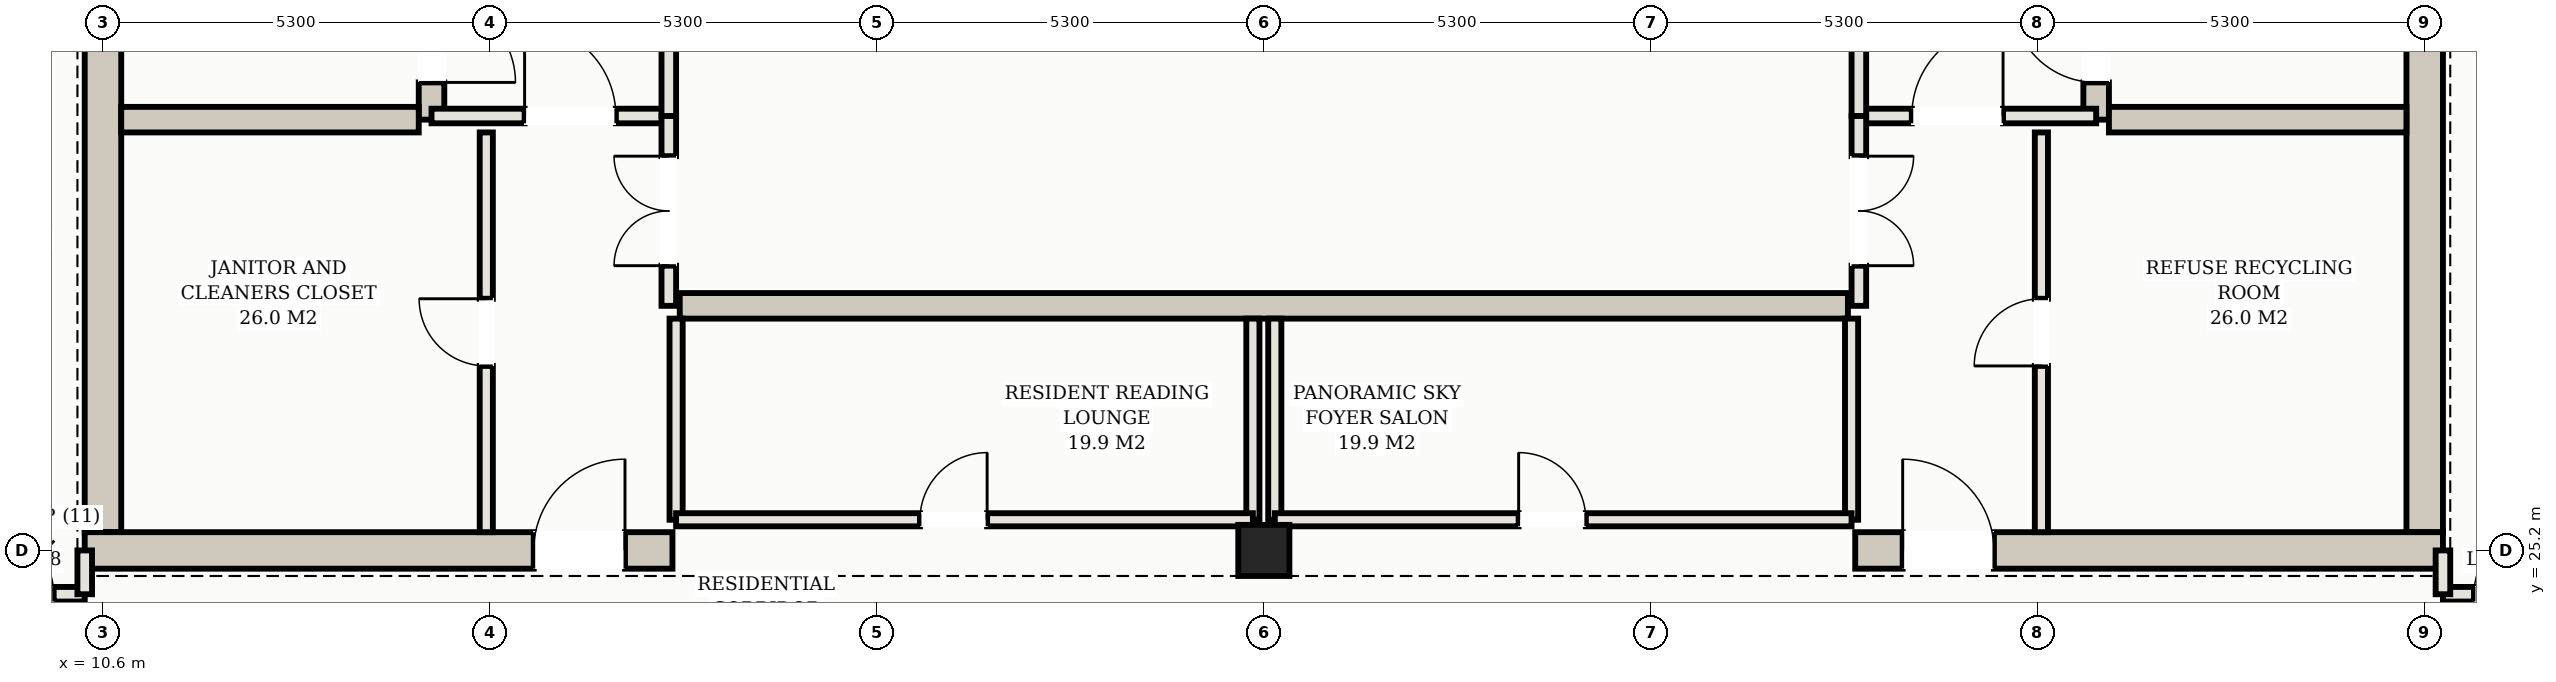
"""IFC4 building model, lengths in metres.
Left out: names, types, materials, properties, quantities, classifications, styles, units other than length and angle.
Written with IfcOpenShell. Run it as: python <this file> out.ifc"""

import sys

from ifc_helpers import new_model, si_unit, direction, frame, frame_2d, origin, origin_2d, place, context, subcontext, project, spatial, rectangle, hollow_rectangle, extrude, element, fill, save


model = new_model("IFC4")
c1 = context("Model", 3, precision=1e-05, world=origin(), true_north=direction((0.0, 1.0)))
c2 = subcontext(c1, "Body", "Model", "MODEL_VIEW")
j1 = project(units=[si_unit("LENGTHUNIT", "METRE"), si_unit("PLANEANGLEUNIT", "RADIAN")], contexts=[c1])
p1 = place(None, origin())
s1 = spatial("IfcSite", under=j1, at=p1, CompositionType="ELEMENT")
p2 = place(p1, origin())
s2 = spatial("IfcBuilding", under=s1, at=p2, CompositionType="ELEMENT")
p3 = place(p2, frame((0.0, 0.0, 239.6)))
s3 = spatial("IfcBuildingStorey", under=s2, at=p3, CompositionType="ELEMENT", Elevation=239.6)
for number, where, z_axis, x_axis in (
    (1, (10.6, 25.45, 0.0), (0.0, 0.0, 1.0), (0.0, 1.0, 0.0)),
    (2, (42.4, 25.45, 0.0), (0.0, 0.0, 1.0), (0.0, 1.0, 0.0)),
):
    element("IfcWall", number, at=place(p3, frame(where, z_axis=z_axis, x_axis=x_axis)), inside=s3, PredefinedType="SHEAR", context=c2, shape_type="SweptSolid", body=[
        extrude(rectangle(XDim=14.3, YDim=0.5, at=frame_2d((7.15, 0.0))), origin(), (0.0, 0.0, 1.0), 3.11),
    ])
p4 = place(p3, frame((10.35, 25.2, 0.0), z_axis=(0.0, 0.0, 1.0), x_axis=(1.0, 0.0, 0.0)))
e3 = element("IfcWall", 3, at=p4, inside=s3, PredefinedType="SHEAR", context=c2, shape_type="SweptSolid", body=[
    extrude(rectangle(XDim=8.05, YDim=0.5, at=frame_2d((4.025, 0.0))), origin(), (0.0, 0.0, 1.0), 3.11),
])
p5 = place(p4, frame((6.15, 0.0, 0.0)))
e4 = element("IfcOpeningElement", 4, at=p5, cuts=e3, PredefinedType="OPENING", context=c2, shape_type="SweptSolid", body=[
    extrude(rectangle(XDim=1.25, YDim=2.2, at=frame_2d((0.625, 1.1))), frame((0.0, 0.26, 0.0), z_axis=(0.0, -1.0, 0.0), x_axis=(1.0, 0.0, 0.0)), (0.0, 0.0, 1.0), 0.52),
])
p6 = place(p3, frame((34.6, 25.2, 0.0), z_axis=(0.0, 0.0, 1.0), x_axis=(1.0, 0.0, 0.0)))
e5 = element("IfcWall", 5, at=p6, inside=s3, PredefinedType="SHEAR", context=c2, shape_type="SweptSolid", body=[
    extrude(rectangle(XDim=8.05, YDim=0.5, at=frame_2d((4.025, 0.0))), origin(), (0.0, 0.0, 1.0), 3.11),
])
p7 = place(p6, frame((0.65, 0.0, 0.0)))
e6 = element("IfcOpeningElement", 6, at=p7, cuts=e5, PredefinedType="OPENING", context=c2, shape_type="SweptSolid", body=[
    extrude(rectangle(XDim=1.25, YDim=2.2, at=frame_2d((0.625, 1.1))), frame((0.0, 0.26, 0.0), z_axis=(0.0, -1.0, 0.0), x_axis=(1.0, 0.0, 0.0)), (0.0, 0.0, 1.0), 0.52),
])
p8 = place(p3, frame((15.1, 31.1, 0.0), z_axis=(0.0, 0.0, 1.0), x_axis=(0.0, 1.0, 0.0)))
e7 = element("IfcWall", 7, at=p8, inside=s3, PredefinedType="SHEAR", context=c2, shape_type="SweptSolid", body=[
    extrude(rectangle(XDim=8.65, YDim=0.35, at=frame_2d((4.325, 0.0))), origin(), (0.0, 0.0, 1.0), 3.11),
])
p9 = place(p8, frame((0.51, 0.0, 0.0)))
e8 = element("IfcOpeningElement", 8, at=p9, cuts=e7, PredefinedType="OPENING", context=c2, shape_type="SweptSolid", body=[
    extrude(rectangle(XDim=1.15, YDim=2.2, at=frame_2d((0.575, 1.1))), frame((0.0, 0.185, 0.0), z_axis=(0.0, -1.0, 0.0), x_axis=(1.0, 0.0, 0.0)), (0.0, 0.0, 1.0), 0.37),
])
p10 = place(p3, frame((10.85, 31.1, 0.0), z_axis=(0.0, 0.0, 1.0), x_axis=(1.0, 0.0, 0.0)))
e9 = element("IfcWall", 9, at=p10, inside=s3, PredefinedType="SHEAR", context=c2, shape_type="SweptSolid", body=[
    extrude(rectangle(XDim=4.075, YDim=0.35, at=frame_2d((2.038, 0.0))), origin(), (0.0, 0.0, 1.0), 3.11),
])
p11 = place(p3, frame((37.9, 31.1, 0.0), z_axis=(0.0, 0.0, 1.0), x_axis=(0.0, 1.0, 0.0)))
e10 = element("IfcWall", 10, at=p11, inside=s3, PredefinedType="SHEAR", context=c2, shape_type="SweptSolid", body=[
    extrude(rectangle(XDim=8.65, YDim=0.35, at=frame_2d((4.325, 0.0))), origin(), (0.0, 0.0, 1.0), 3.11),
])
p12 = place(p11, frame((0.51, 0.0, 0.0)))
e11 = element("IfcOpeningElement", 11, at=p12, cuts=e10, PredefinedType="OPENING", context=c2, shape_type="SweptSolid", body=[
    extrude(rectangle(XDim=1.15, YDim=2.2, at=frame_2d((0.575, 1.1))), frame((0.0, 0.185, 0.0), z_axis=(0.0, -1.0, 0.0), x_axis=(1.0, 0.0, 0.0)), (0.0, 0.0, 1.0), 0.37),
])
p13 = place(p3, frame((38.075, 31.1, 0.0), z_axis=(0.0, 0.0, 1.0), x_axis=(1.0, 0.0, 0.0)))
e12 = element("IfcWall", 12, at=p13, inside=s3, PredefinedType="SHEAR", context=c2, shape_type="SweptSolid", body=[
    extrude(rectangle(XDim=4.075, YDim=0.35, at=frame_2d((2.038, 0.0))), origin(), (0.0, 0.0, 1.0), 3.11),
])
p14 = place(p3, frame((18.5, 28.55, 0.0), z_axis=(0.0, 0.0, 1.0), x_axis=(1.0, 0.0, 0.0)))
e13 = element("IfcWall", 13, at=p14, inside=s3, PredefinedType="SHEAR", context=c2, shape_type="SweptSolid", body=[
    extrude(rectangle(XDim=16.0, YDim=0.35, at=frame_2d((8.0, 0.0))), origin(), (0.0, 0.0, 1.0), 3.11),
])
p15 = place(p3, frame((26.5, 25.2, 0.0), z_axis=(0.0, 0.0, 1.0), x_axis=(1.0, 0.0, 0.0)))
e14 = element("IfcColumn", 14, at=p15, inside=s3, PredefinedType="COLUMN", context=c2, shape_type="SweptSolid", body=[
    extrude(hollow_rectangle(XDim=0.7, YDim=0.7, WallThickness=0.025, at=origin_2d()), origin(), (0.0, 0.0, 1.0), 3.3),
])
p16 = place(p3, frame((15.1, 31.15, 0.0), z_axis=(0.0, 0.0, 1.0), x_axis=(1.0, 0.0, 0.0)))
e15 = element("IfcWall", 15, at=p16, inside=s3, PredefinedType="PARTITIONING", context=c2, shape_type="SweptSolid", body=[
    extrude(rectangle(XDim=3.25, YDim=0.2, at=frame_2d((1.625, 0.0))), origin(), (0.0, 0.0, 1.0), 2.45),
])
p17 = place(p16, frame((1.275, 0.0, 0.0)))
e16 = element("IfcOpeningElement", 16, at=p17, cuts=e15, PredefinedType="OPENING", context=c2, shape_type="SweptSolid", body=[
    extrude(rectangle(XDim=1.25, YDim=2.2, at=frame_2d((0.625, 1.1))), frame((0.0, 0.11, 0.0), z_axis=(0.0, -1.0, 0.0), x_axis=(1.0, 0.0, 0.0)), (0.0, 0.0, 1.0), 0.22),
])
p18 = place(p3, frame((18.35, 31.15, 0.0), z_axis=(0.0, 0.0, 1.0), x_axis=(0.0, 1.0, 0.0)))
e17 = element("IfcWall", 17, at=p18, inside=s3, PredefinedType="PARTITIONING", context=c2, shape_type="SweptSolid", body=[
    extrude(rectangle(XDim=5.15, YDim=0.2, at=frame_2d((2.575, 0.0))), origin(), (0.0, 0.0, 1.0), 2.45),
])
p19 = place(p18, frame((1.875, 0.0, 0.0)))
e18 = element("IfcOpeningElement", 18, at=p19, cuts=e17, PredefinedType="OPENING", context=c2, shape_type="SweptSolid", body=[
    extrude(rectangle(XDim=1.25, YDim=2.2, at=frame_2d((0.625, 1.1))), frame((0.0, 0.11, 0.0), z_axis=(0.0, -1.0, 0.0), x_axis=(1.0, 0.0, 0.0)), (0.0, 0.0, 1.0), 0.22),
])
p20 = place(p3, frame((34.65, 31.15, 0.0), z_axis=(0.0, 0.0, 1.0), x_axis=(1.0, 0.0, 0.0)))
e19 = element("IfcWall", 19, at=p20, inside=s3, PredefinedType="PARTITIONING", context=c2, shape_type="SweptSolid", body=[
    extrude(rectangle(XDim=3.25, YDim=0.2, at=frame_2d((1.625, 0.0))), origin(), (0.0, 0.0, 1.0), 2.45),
])
p21 = place(p20, frame((0.725, 0.0, 0.0)))
e20 = element("IfcOpeningElement", 20, at=p21, cuts=e19, PredefinedType="OPENING", context=c2, shape_type="SweptSolid", body=[
    extrude(rectangle(XDim=1.25, YDim=2.2, at=frame_2d((0.625, 1.1))), frame((0.0, 0.11, 0.0), z_axis=(0.0, -1.0, 0.0), x_axis=(1.0, 0.0, 0.0)), (0.0, 0.0, 1.0), 0.22),
])
p22 = place(p3, frame((34.65, 31.15, 0.0), z_axis=(0.0, 0.0, 1.0), x_axis=(0.0, 1.0, 0.0)))
e21 = element("IfcWall", 21, at=p22, inside=s3, PredefinedType="PARTITIONING", context=c2, shape_type="SweptSolid", body=[
    extrude(rectangle(XDim=5.15, YDim=0.2, at=frame_2d((2.575, 0.0))), origin(), (0.0, 0.0, 1.0), 2.45),
])
p23 = place(p22, frame((1.875, 0.0, 0.0)))
e22 = element("IfcOpeningElement", 22, at=p23, cuts=e21, PredefinedType="OPENING", context=c2, shape_type="SweptSolid", body=[
    extrude(rectangle(XDim=1.25, YDim=2.2, at=frame_2d((0.625, 1.1))), frame((0.0, 0.11, 0.0), z_axis=(0.0, -1.0, 0.0), x_axis=(1.0, 0.0, 0.0)), (0.0, 0.0, 1.0), 0.22),
])
p24 = place(p3, frame((15.85, 25.45, 0.0), z_axis=(0.0, 0.0, 1.0), x_axis=(0.0, 1.0, 0.0)))
e23 = element("IfcWall", 23, at=p24, inside=s3, PredefinedType="PARTITIONING", context=c2, shape_type="SweptSolid", body=[
    extrude(rectangle(XDim=5.475, YDim=0.18, at=frame_2d((2.738, 0.0))), origin(), (0.0, 0.0, 1.0), 2.45),
])
p25 = place(p24, frame((2.277, 0.0, 0.0)))
e24 = element("IfcOpeningElement", 24, at=p25, cuts=e23, PredefinedType="OPENING", context=c2, shape_type="SweptSolid", body=[
    extrude(rectangle(XDim=0.92, YDim=2.15, at=frame_2d((0.46, 1.075))), frame((0.0, 0.1, 0.0), z_axis=(0.0, -1.0, 0.0), x_axis=(1.0, 0.0, 0.0)), (0.0, 0.0, 1.0), 0.2),
])
p26 = place(p3, frame((37.15, 25.45, 0.0), z_axis=(0.0, 0.0, 1.0), x_axis=(0.0, 1.0, 0.0)))
e25 = element("IfcWall", 25, at=p26, inside=s3, PredefinedType="PARTITIONING", context=c2, shape_type="SweptSolid", body=[
    extrude(rectangle(XDim=5.475, YDim=0.18, at=frame_2d((2.738, 0.0))), origin(), (0.0, 0.0, 1.0), 2.45),
])
p27 = place(p26, frame((2.277, 0.0, 0.0)))
e26 = element("IfcOpeningElement", 26, at=p27, cuts=e25, PredefinedType="OPENING", context=c2, shape_type="SweptSolid", body=[
    extrude(rectangle(XDim=0.92, YDim=2.15, at=frame_2d((0.46, 1.075))), frame((0.0, 0.1, 0.0), z_axis=(0.0, -1.0, 0.0), x_axis=(1.0, 0.0, 0.0)), (0.0, 0.0, 1.0), 0.2),
])
p28 = place(p3, frame((18.35, 28.55, 0.0), z_axis=(0.0, 0.0, 1.0), x_axis=(0.0, 1.0, 0.0)))
e27 = element("IfcWall", 27, at=p28, inside=s3, PredefinedType="PARTITIONING", context=c2, shape_type="SweptSolid", body=[
    extrude(rectangle(XDim=2.6, YDim=0.2, at=frame_2d((1.3, 0.0))), origin(), (0.0, 0.0, 1.0), 2.45),
])
p29 = place(p28, frame((0.55, 0.0, 0.0)))
e28 = element("IfcOpeningElement", 28, at=p29, cuts=e27, PredefinedType="OPENING", context=c2, shape_type="SweptSolid", body=[
    extrude(rectangle(XDim=1.5, YDim=2.25, at=frame_2d((0.75, 1.125))), frame((0.0, 0.11, 0.0), z_axis=(0.0, -1.0, 0.0), x_axis=(1.0, 0.0, 0.0)), (0.0, 0.0, 1.0), 0.22),
])
p30 = place(p3, frame((34.65, 28.55, 0.0), z_axis=(0.0, 0.0, 1.0), x_axis=(0.0, 1.0, 0.0)))
e29 = element("IfcWall", 29, at=p30, inside=s3, PredefinedType="PARTITIONING", context=c2, shape_type="SweptSolid", body=[
    extrude(rectangle(XDim=2.6, YDim=0.2, at=frame_2d((1.3, 0.0))), origin(), (0.0, 0.0, 1.0), 2.45),
])
p31 = place(p30, frame((0.55, 0.0, 0.0)))
e30 = element("IfcOpeningElement", 30, at=p31, cuts=e29, PredefinedType="OPENING", context=c2, shape_type="SweptSolid", body=[
    extrude(rectangle(XDim=1.5, YDim=2.25, at=frame_2d((0.75, 1.125))), frame((0.0, 0.11, 0.0), z_axis=(0.0, -1.0, 0.0), x_axis=(1.0, 0.0, 0.0)), (0.0, 0.0, 1.0), 0.22),
])
for number, where, z_axis, x_axis in (
    (31, (18.45, 25.62, 0.0), (0.0, 0.0, 1.0), (0.0, 1.0, 0.0)),
    (32, (26.35, 25.62, 0.0), (0.0, 0.0, 1.0), (0.0, 1.0, 0.0)),
):
    element("IfcWall", number, at=place(p3, frame(where, z_axis=z_axis, x_axis=x_axis)), inside=s3, PredefinedType="PARTITIONING", context=c2, shape_type="SweptSolid", body=[
        extrude(rectangle(XDim=2.755, YDim=0.18, at=frame_2d((1.377, 0.0))), origin(), (0.0, 0.0, 1.0), 2.45),
    ])
p32 = place(p3, frame((18.45, 25.62, 0.0), z_axis=(0.0, 0.0, 1.0), x_axis=(1.0, 0.0, 0.0)))
e33 = element("IfcWall", 33, at=p32, inside=s3, PredefinedType="PARTITIONING", context=c2, shape_type="SweptSolid", body=[
    extrude(rectangle(XDim=7.9, YDim=0.18, at=frame_2d((3.95, 0.0))), origin(), (0.0, 0.0, 1.0), 2.45),
])
p33 = place(p32, frame((3.34, 0.0, 0.0)))
e34 = element("IfcOpeningElement", 34, at=p33, cuts=e33, PredefinedType="OPENING", context=c2, shape_type="SweptSolid", body=[
    extrude(rectangle(XDim=0.92, YDim=2.15, at=frame_2d((0.46, 1.075))), frame((0.0, 0.1, 0.0), z_axis=(0.0, -1.0, 0.0), x_axis=(1.0, 0.0, 0.0)), (0.0, 0.0, 1.0), 0.2),
])
for number, where, z_axis, x_axis in (
    (35, (26.65, 25.62, 0.0), (0.0, 0.0, 1.0), (0.0, 1.0, 0.0)),
    (36, (34.55, 25.62, 0.0), (0.0, 0.0, 1.0), (0.0, 1.0, 0.0)),
):
    element("IfcWall", number, at=place(p3, frame(where, z_axis=z_axis, x_axis=x_axis)), inside=s3, PredefinedType="PARTITIONING", context=c2, shape_type="SweptSolid", body=[
        extrude(rectangle(XDim=2.755, YDim=0.18, at=frame_2d((1.377, 0.0))), origin(), (0.0, 0.0, 1.0), 2.45),
    ])
p34 = place(p3, frame((26.65, 25.62, 0.0), z_axis=(0.0, 0.0, 1.0), x_axis=(1.0, 0.0, 0.0)))
e37 = element("IfcWall", 37, at=p34, inside=s3, PredefinedType="PARTITIONING", context=c2, shape_type="SweptSolid", body=[
    extrude(rectangle(XDim=7.9, YDim=0.18, at=frame_2d((3.95, 0.0))), origin(), (0.0, 0.0, 1.0), 2.45),
])
p35 = place(p34, frame((3.34, 0.0, 0.0)))
e38 = element("IfcOpeningElement", 38, at=p35, cuts=e37, PredefinedType="OPENING", context=c2, shape_type="SweptSolid", body=[
    extrude(rectangle(XDim=0.92, YDim=2.15, at=frame_2d((0.46, 1.075))), frame((0.0, 0.1, 0.0), z_axis=(0.0, -1.0, 0.0), x_axis=(1.0, 0.0, 0.0)), (0.0, 0.0, 1.0), 0.2),
])
p36 = place(p3, frame((8.6, 24.6, 0.0), z_axis=(0.0, 0.0, 1.0), x_axis=(1.0, 0.0, 0.0)))
e39 = element("IfcWall", 39, at=p36, inside=s3, PredefinedType="PARTITIONING", context=c2, shape_type="SweptSolid", body=[
    extrude(rectangle(XDim=1.75, YDim=0.2, at=frame_2d((0.875, 0.0))), origin(), (0.0, 0.0, 1.0), 2.45),
])
p37 = place(p36, frame((0.425, 0.0, 0.0)))
e40 = element("IfcOpeningElement", 40, at=p37, cuts=e39, PredefinedType="OPENING", context=c2, shape_type="SweptSolid", body=[
    extrude(rectangle(XDim=0.9, YDim=2.15, at=frame_2d((0.45, 1.075))), frame((0.0, 0.11, 0.0), z_axis=(0.0, -1.0, 0.0), x_axis=(1.0, 0.0, 0.0)), (0.0, 0.0, 1.0), 0.22),
])
p38 = place(p3, frame((10.35, 24.6, 0.0), z_axis=(0.0, 0.0, 1.0), x_axis=(0.0, 1.0, 0.0)))
e41 = element("IfcWall", 41, at=p38, inside=s3, PredefinedType="PARTITIONING", context=c2, shape_type="SweptSolid", body=[
    extrude(rectangle(XDim=0.6, YDim=0.2, at=frame_2d((0.3, 0.0))), origin(), (0.0, 0.0, 1.0), 2.45),
])
p39 = place(p3, frame((42.65, 24.6, 0.0), z_axis=(0.0, 0.0, 1.0), x_axis=(1.0, 0.0, 0.0)))
e42 = element("IfcWall", 42, at=p39, inside=s3, PredefinedType="PARTITIONING", context=c2, shape_type="SweptSolid", body=[
    extrude(rectangle(XDim=1.75, YDim=0.2, at=frame_2d((0.875, 0.0))), origin(), (0.0, 0.0, 1.0), 2.45),
])
p40 = place(p39, frame((0.425, 0.0, 0.0)))
e43 = element("IfcOpeningElement", 43, at=p40, cuts=e42, PredefinedType="OPENING", context=c2, shape_type="SweptSolid", body=[
    extrude(rectangle(XDim=0.9, YDim=2.15, at=frame_2d((0.45, 1.075))), frame((0.0, 0.11, 0.0), z_axis=(0.0, -1.0, 0.0), x_axis=(1.0, 0.0, 0.0)), (0.0, 0.0, 1.0), 0.22),
])
p41 = place(p3, frame((42.65, 24.6, 0.0), z_axis=(0.0, 0.0, 1.0), x_axis=(0.0, 1.0, 0.0)))
e44 = element("IfcWall", 44, at=p41, inside=s3, PredefinedType="PARTITIONING", context=c2, shape_type="SweptSolid", body=[
    extrude(rectangle(XDim=0.6, YDim=0.2, at=frame_2d((0.3, 0.0))), origin(), (0.0, 0.0, 1.0), 2.45),
])
p42 = place(p5, origin())
e45 = element("IfcDoor", 45, at=p42, inside=s3, OperationType="SINGLE_SWING_RIGHT", PredefinedType="DOOR", context=c2, shape_type="SweptSolid", body=[
    extrude(rectangle(XDim=1.25, YDim=2.2, at=frame_2d((0.625, 1.1))), frame((0.0, 0.025, 0.0), z_axis=(0.0, -1.0, 0.0), x_axis=(1.0, 0.0, 0.0)), (0.0, 0.0, 1.0), 0.05),
])
fill(e4, e45)
p43 = place(p7, origin())
e46 = element("IfcDoor", 46, at=p43, inside=s3, OperationType="SINGLE_SWING_LEFT", PredefinedType="DOOR", context=c2, shape_type="SweptSolid", body=[
    extrude(rectangle(XDim=1.25, YDim=2.2, at=frame_2d((0.625, 1.1))), frame((0.0, 0.025, 0.0), z_axis=(0.0, -1.0, 0.0), x_axis=(1.0, 0.0, 0.0)), (0.0, 0.0, 1.0), 0.05),
])
fill(e6, e46)
p44 = place(p17, origin())
e47 = element("IfcDoor", 47, at=p44, inside=s3, OperationType="SINGLE_SWING_LEFT", PredefinedType="DOOR", context=c2, shape_type="SweptSolid", body=[
    extrude(rectangle(XDim=1.25, YDim=2.2, at=frame_2d((0.625, 1.1))), frame((0.0, 0.025, 0.0), z_axis=(0.0, -1.0, 0.0), x_axis=(1.0, 0.0, 0.0)), (0.0, 0.0, 1.0), 0.05),
])
fill(e16, e47)
p45 = place(p21, origin())
e48 = element("IfcDoor", 48, at=p45, inside=s3, OperationType="SINGLE_SWING_RIGHT", PredefinedType="DOOR", context=c2, shape_type="SweptSolid", body=[
    extrude(rectangle(XDim=1.25, YDim=2.2, at=frame_2d((0.625, 1.1))), frame((0.0, 0.025, 0.0), z_axis=(0.0, -1.0, 0.0), x_axis=(1.0, 0.0, 0.0)), (0.0, 0.0, 1.0), 0.05),
])
fill(e20, e48)
p46 = place(p9, frame((1.15, 0.0, 0.0), z_axis=(0.0, 0.0, 1.0), x_axis=(-1.0, 0.0, 0.0)))
e49 = element("IfcDoor", 49, at=p46, inside=s3, OperationType="SINGLE_SWING_RIGHT", PredefinedType="DOOR", context=c2, shape_type="SweptSolid", body=[
    extrude(rectangle(XDim=1.15, YDim=2.2, at=frame_2d((0.575, 1.1))), frame((0.0, 0.025, 0.0), z_axis=(0.0, -1.0, 0.0), x_axis=(1.0, 0.0, 0.0)), (0.0, 0.0, 1.0), 0.05),
])
fill(e8, e49)
p47 = place(p12, origin())
e50 = element("IfcDoor", 50, at=p47, inside=s3, OperationType="SINGLE_SWING_RIGHT", PredefinedType="DOOR", context=c2, shape_type="SweptSolid", body=[
    extrude(rectangle(XDim=1.15, YDim=2.2, at=frame_2d((0.575, 1.1))), frame((0.0, 0.025, 0.0), z_axis=(0.0, -1.0, 0.0), x_axis=(1.0, 0.0, 0.0)), (0.0, 0.0, 1.0), 0.05),
])
fill(e11, e50)
p48 = place(p25, origin())
e51 = element("IfcDoor", 51, at=p48, inside=s3, OperationType="SINGLE_SWING_RIGHT", PredefinedType="DOOR", context=c2, shape_type="SweptSolid", body=[
    extrude(rectangle(XDim=0.92, YDim=2.15, at=frame_2d((0.46, 1.075))), frame((0.0, 0.025, 0.0), z_axis=(0.0, -1.0, 0.0), x_axis=(1.0, 0.0, 0.0)), (0.0, 0.0, 1.0), 0.05),
])
fill(e24, e51)
p49 = place(p27, origin())
e52 = element("IfcDoor", 52, at=p49, inside=s3, OperationType="SINGLE_SWING_LEFT", PredefinedType="DOOR", context=c2, shape_type="SweptSolid", body=[
    extrude(rectangle(XDim=0.92, YDim=2.15, at=frame_2d((0.46, 1.075))), frame((0.0, 0.025, 0.0), z_axis=(0.0, -1.0, 0.0), x_axis=(1.0, 0.0, 0.0)), (0.0, 0.0, 1.0), 0.05),
])
fill(e26, e52)
p50 = place(p29, origin())
e53 = element("IfcDoor", 53, at=p50, inside=s3, OperationType="DOUBLE_DOOR_SINGLE_SWING", PredefinedType="DOOR", context=c2, shape_type="SweptSolid", body=[
    extrude(rectangle(XDim=1.5, YDim=2.25, at=frame_2d((0.75, 1.125))), frame((0.0, 0.025, 0.0), z_axis=(0.0, -1.0, 0.0), x_axis=(1.0, 0.0, 0.0)), (0.0, 0.0, 1.0), 0.05),
])
fill(e28, e53)
p51 = place(p31, frame((1.5, 0.0, 0.0), z_axis=(0.0, 0.0, 1.0), x_axis=(-1.0, 0.0, 0.0)))
e54 = element("IfcDoor", 54, at=p51, inside=s3, OperationType="DOUBLE_DOOR_SINGLE_SWING", PredefinedType="DOOR", context=c2, shape_type="SweptSolid", body=[
    extrude(rectangle(XDim=1.5, YDim=2.25, at=frame_2d((0.75, 1.125))), frame((0.0, 0.025, 0.0), z_axis=(0.0, -1.0, 0.0), x_axis=(1.0, 0.0, 0.0)), (0.0, 0.0, 1.0), 0.05),
])
fill(e30, e54)
p52 = place(p33, origin())
e55 = element("IfcDoor", 55, at=p52, inside=s3, OperationType="SINGLE_SWING_RIGHT", PredefinedType="DOOR", context=c2, shape_type="SweptSolid", body=[
    extrude(rectangle(XDim=0.92, YDim=2.15, at=frame_2d((0.46, 1.075))), frame((0.0, 0.025, 0.0), z_axis=(0.0, -1.0, 0.0), x_axis=(1.0, 0.0, 0.0)), (0.0, 0.0, 1.0), 0.05),
])
fill(e34, e55)
p53 = place(p35, origin())
e56 = element("IfcDoor", 56, at=p53, inside=s3, OperationType="SINGLE_SWING_LEFT", PredefinedType="DOOR", context=c2, shape_type="SweptSolid", body=[
    extrude(rectangle(XDim=0.92, YDim=2.15, at=frame_2d((0.46, 1.075))), frame((0.0, 0.025, 0.0), z_axis=(0.0, -1.0, 0.0), x_axis=(1.0, 0.0, 0.0)), (0.0, 0.0, 1.0), 0.05),
])
fill(e38, e56)
p54 = place(p37, origin())
e57 = element("IfcDoor", 57, at=p54, inside=s3, OperationType="SINGLE_SWING_LEFT", PredefinedType="DOOR", context=c2, shape_type="SweptSolid", body=[
    extrude(rectangle(XDim=0.9, YDim=2.15, at=frame_2d((0.45, 1.075))), frame((0.0, 0.025, 0.0), z_axis=(0.0, -1.0, 0.0), x_axis=(1.0, 0.0, 0.0)), (0.0, 0.0, 1.0), 0.05),
])
fill(e40, e57)
p55 = place(p40, origin())
e58 = element("IfcDoor", 58, at=p55, inside=s3, OperationType="SINGLE_SWING_RIGHT", PredefinedType="DOOR", context=c2, shape_type="SweptSolid", body=[
    extrude(rectangle(XDim=0.9, YDim=2.15, at=frame_2d((0.45, 1.075))), frame((0.0, 0.025, 0.0), z_axis=(0.0, -1.0, 0.0), x_axis=(1.0, 0.0, 0.0)), (0.0, 0.0, 1.0), 0.05),
])
fill(e43, e58)
save(model, sys.argv[1])
